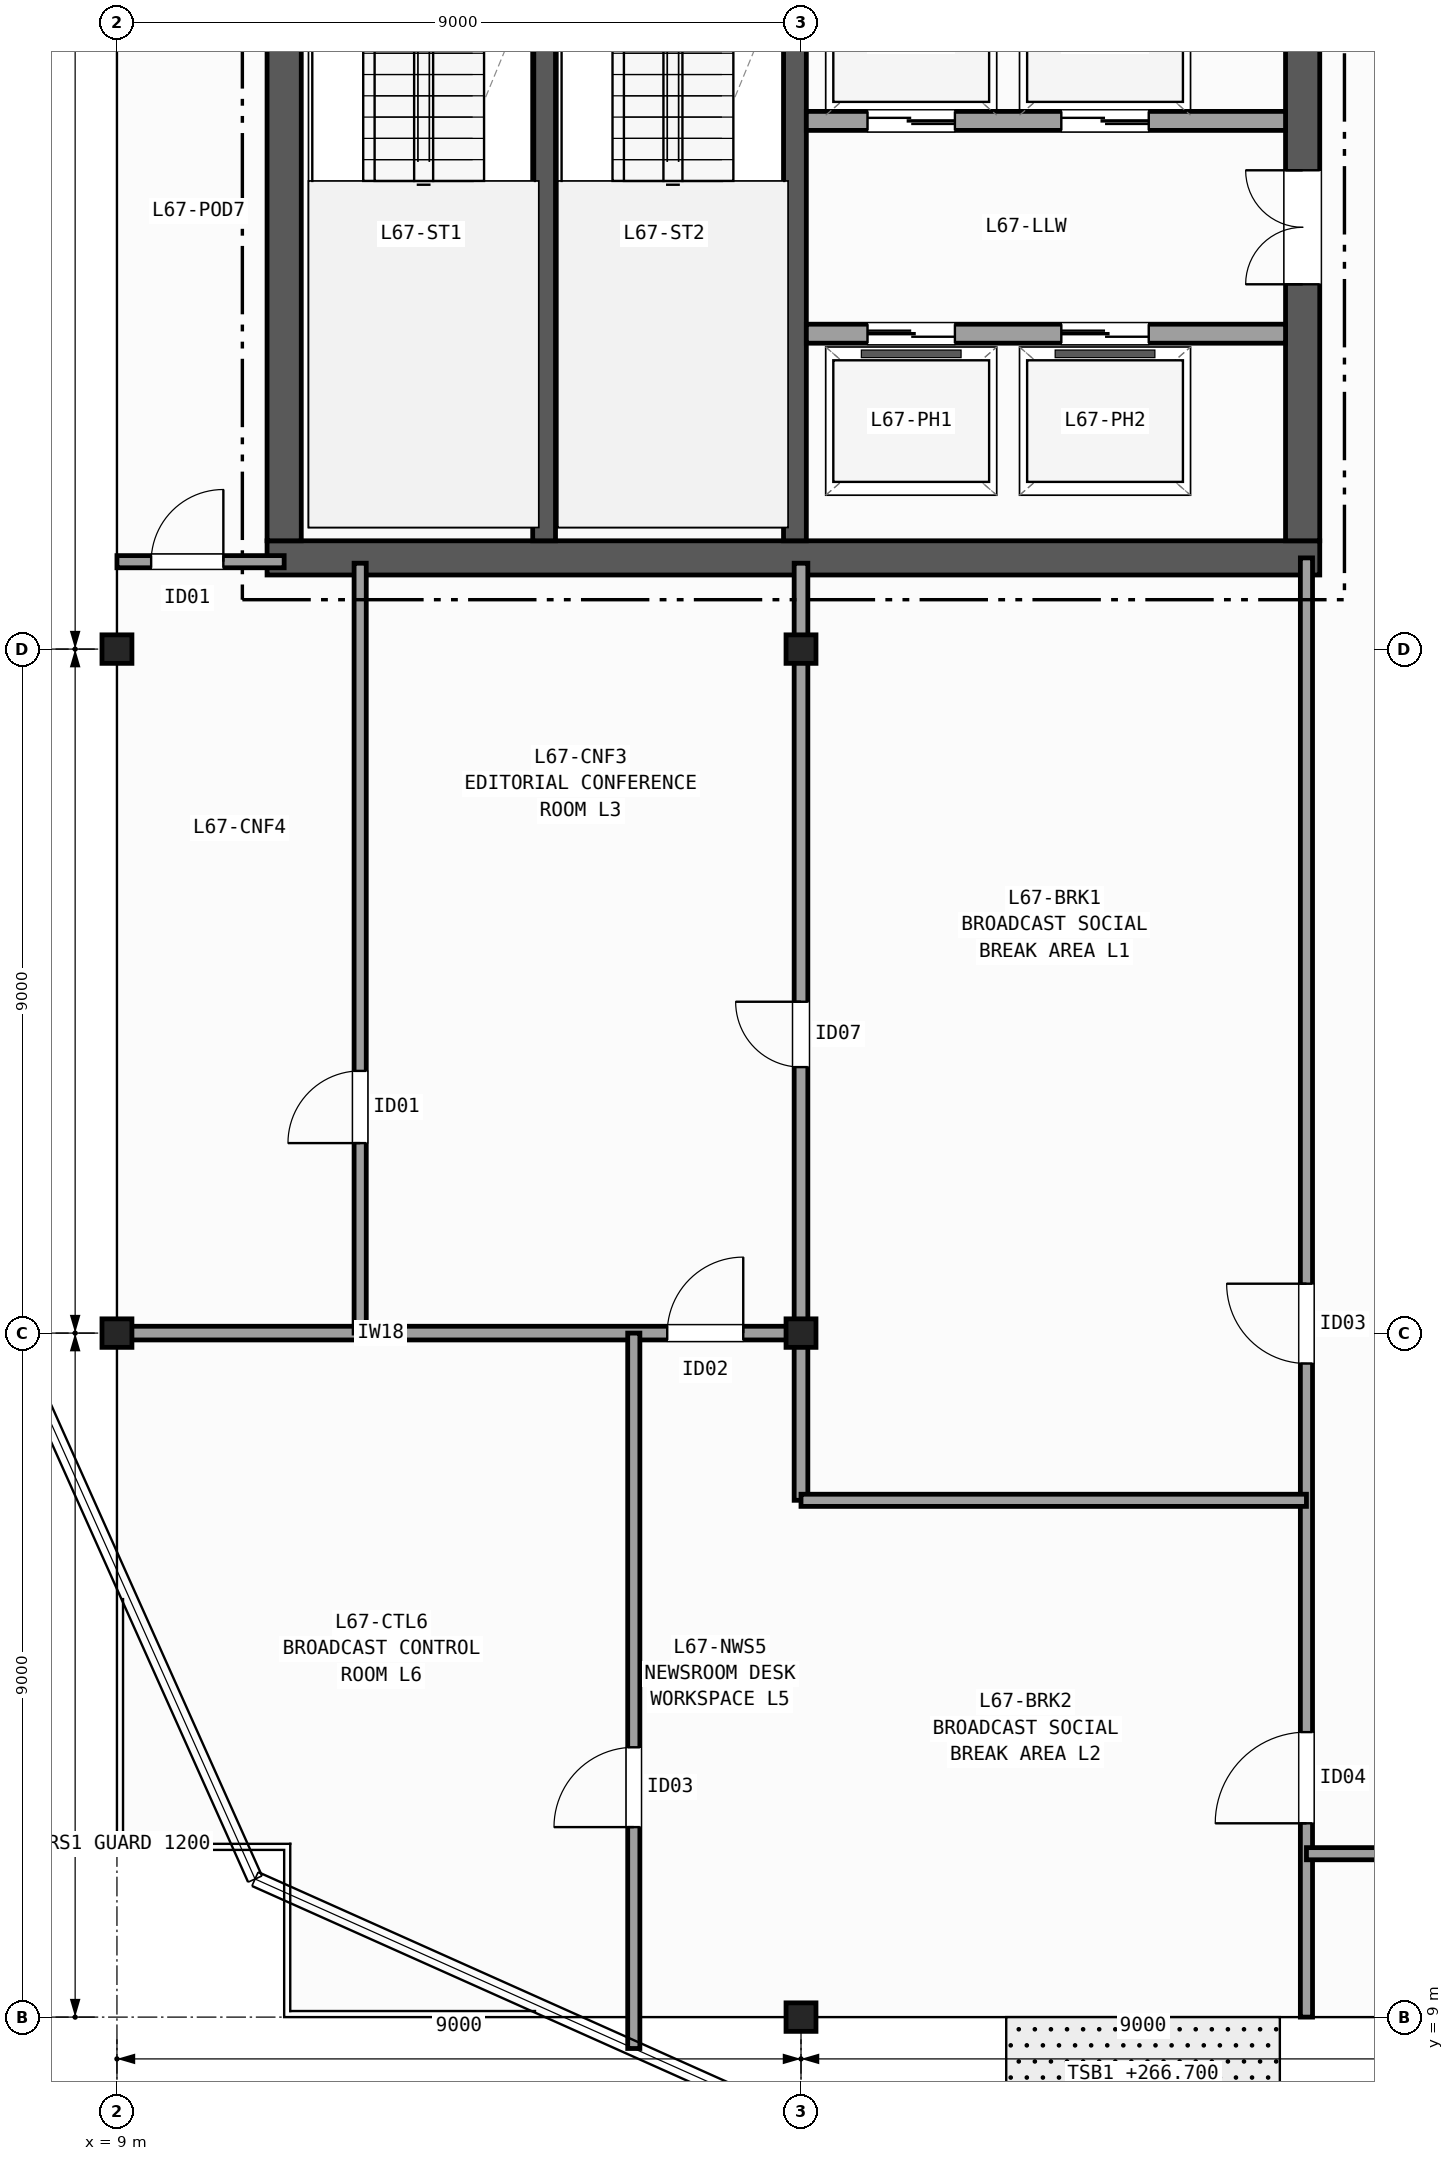
"""IFC4 building model, lengths in metres.
Left out: names, types, materials, properties, quantities, classifications, styles, units other than length and angle.
Written with IfcOpenShell. Run it as: python <this file> out.ifc"""

import sys

from ifc_helpers import new_model, si_unit, direction, frame, frame_2d, origin, origin_2d, place, context, subcontext, project, spatial, rectangle, i_section, extrude, element, fill, save


model = new_model("IFC4")
c1 = context("Model", 3, precision=1e-05, world=origin(), true_north=direction((0.0, 1.0)))
c2 = subcontext(c1, "Body", "Model", "MODEL_VIEW")
j1 = project(units=[si_unit("LENGTHUNIT", "METRE"), si_unit("PLANEANGLEUNIT", "RADIAN")], contexts=[c1])
p1 = place(None, origin())
s1 = spatial("IfcSite", under=j1, at=p1, CompositionType="ELEMENT")
p2 = place(p1, origin())
s2 = spatial("IfcBuilding", under=s1, at=p2, CompositionType="ELEMENT")
p3 = place(p2, frame((0.0, 0.0, 266.7)))
s3 = spatial("IfcBuildingStorey", under=s2, at=p3, CompositionType="ELEMENT", Elevation=266.7)
for number, where, z_axis, x_axis in (
    (1, (9.0, 18.0, 0.0), (0.0, 0.0, 1.0), (1.0, 0.0, 0.0)),
    (2, (9.0, 27.0, 0.0), (0.0, 0.0, 1.0), (1.0, 0.0, 0.0)),
    (3, (18.0, 9.0, 0.0), (0.0, 0.0, 1.0), (1.0, 0.0, 0.0)),
    (4, (18.0, 18.0, 0.0), (0.0, 0.0, 1.0), (1.0, 0.0, 0.0)),
    (5, (18.0, 27.0, 0.0), (0.0, 0.0, 1.0), (1.0, 0.0, 0.0)),
):
    element("IfcColumn", number, at=place(p3, frame(where, z_axis=z_axis, x_axis=x_axis)), inside=s3, PredefinedType="COLUMN", context=c2, shape_type="SweptSolid", body=[
        extrude(i_section(OverallWidth=0.394, OverallDepth=0.375, WebThickness=0.017, FlangeThickness=0.028, FilletRadius=0.015, at=origin_2d()), origin(), (0.0, 0.0, 1.0), 3.7),
    ])
p4 = place(p3, frame((10.975, 28.2, 0.0), z_axis=(0.0, 0.0, 1.0), x_axis=(1.0, 0.0, 0.0)))
e6 = element("IfcWall", 6, at=p4, inside=s3, PredefinedType="SHEAR", context=c2, shape_type="SweptSolid", body=[
    extrude(rectangle(XDim=13.85, YDim=0.45, at=frame_2d((6.925, 0.0))), origin(), (0.0, 0.0, 1.0), 3.42),
])
p5 = place(p3, frame((11.2, 42.175, 0.0), z_axis=(0.0, 0.0, 1.0), x_axis=(0.0, -1.0, 0.0)))
e7 = element("IfcWall", 7, at=p5, inside=s3, PredefinedType="SHEAR", context=c2, shape_type="SweptSolid", body=[
    extrude(rectangle(XDim=13.75, YDim=0.45, at=frame_2d((6.875, 0.0))), origin(), (0.0, 0.0, 1.0), 3.42),
])
p6 = place(p3, frame((24.6, 28.425, 0.0), z_axis=(0.0, 0.0, 1.0), x_axis=(0.0, 1.0, 0.0)))
e8 = element("IfcWall", 8, at=p6, inside=s3, PredefinedType="SHEAR", context=c2, shape_type="SweptSolid", body=[
    extrude(rectangle(XDim=13.75, YDim=0.45, at=frame_2d((6.875, 0.0))), origin(), (0.0, 0.0, 1.0), 3.42),
])
p7 = place(p6, frame((3.375, 0.0, 0.0)))
e9 = element("IfcOpeningElement", 9, at=p7, cuts=e8, PredefinedType="OPENING", context=c2, shape_type="SweptSolid", body=[
    extrude(rectangle(XDim=1.5, YDim=2.2, at=frame_2d((0.75, 1.1))), frame((0.0, 0.235, 0.0), z_axis=(0.0, -1.0, 0.0), x_axis=(1.0, 0.0, 0.0)), (0.0, 0.0, 1.0), 0.47),
])
p8 = place(p6, frame((9.975, 0.0, 0.0)))
e10 = element("IfcOpeningElement", 10, at=p8, cuts=e8, PredefinedType="OPENING", context=c2, shape_type="SweptSolid", body=[
    extrude(rectangle(XDim=0.9, YDim=2.1, at=frame_2d((0.45, 1.05))), frame((0.0, 0.235, 0.0), z_axis=(0.0, -1.0, 0.0), x_axis=(1.0, 0.0, 0.0)), (0.0, 0.0, 1.0), 0.47),
])
p9 = place(p6, frame((12.075, 0.0, 0.0)))
e11 = element("IfcOpeningElement", 11, at=p9, cuts=e8, PredefinedType="OPENING", context=c2, shape_type="SweptSolid", body=[
    extrude(rectangle(XDim=0.9, YDim=2.1, at=frame_2d((0.45, 1.05))), frame((0.0, 0.235, 0.0), z_axis=(0.0, -1.0, 0.0), x_axis=(1.0, 0.0, 0.0)), (0.0, 0.0, 1.0), 0.47),
])
p10 = place(p3, frame((14.62, 28.425, 0.0), z_axis=(0.0, 0.0, 1.0), x_axis=(0.0, 1.0, 0.0)))
e12 = element("IfcWall", 12, at=p10, inside=s3, PredefinedType="SHEAR", context=c2, shape_type="SweptSolid", body=[
    extrude(rectangle(XDim=9.025, YDim=0.3, at=frame_2d((4.512, 0.0))), origin(), (0.0, 0.0, 1.0), 3.42),
])
p11 = place(p3, frame((17.92, 42.175, 0.0), z_axis=(0.0, 0.0, 1.0), x_axis=(0.0, -1.0, 0.0)))
e13 = element("IfcWall", 13, at=p11, inside=s3, PredefinedType="SHEAR", context=c2, shape_type="SweptSolid", body=[
    extrude(rectangle(XDim=13.75, YDim=0.3, at=frame_2d((6.875, 0.0))), origin(), (0.0, 0.0, 1.0), 3.42),
])
p12 = place(p11, frame((2.0, 0.0, 0.0)))
e14 = element("IfcOpeningElement", 14, at=p12, cuts=e13, PredefinedType="OPENING", context=c2, shape_type="SweptSolid", body=[
    extrude(rectangle(XDim=1.15, YDim=2.15, at=frame_2d((0.575, 1.075))), frame((0.0, 0.16, 0.0), z_axis=(0.0, -1.0, 0.0), x_axis=(1.0, 0.0, 0.0)), (0.0, 0.0, 1.0), 0.32),
])
p13 = place(p3, frame((18.07, 31.15, 0.0), z_axis=(0.0, 0.0, 1.0), x_axis=(1.0, 0.0, 0.0)))
e15 = element("IfcWall", 15, at=p13, inside=s3, PredefinedType="PARTITIONING", context=c2, shape_type="SweptSolid", body=[
    extrude(rectangle(XDim=6.305, YDim=0.25, at=frame_2d((3.152, 0.0))), origin(), (0.0, 0.0, 1.0), 3.42),
])
p14 = place(p13, frame((0.805, 0.0, 0.0)))
e16 = element("IfcOpeningElement", 16, at=p14, cuts=e15, PredefinedType="OPENING", context=c2, shape_type="SweptSolid", body=[
    extrude(rectangle(XDim=1.15, YDim=2.15, at=frame_2d((0.575, 1.075))), frame((0.0, 0.135, 0.0), z_axis=(0.0, -1.0, 0.0), x_axis=(1.0, 0.0, 0.0)), (0.0, 0.0, 1.0), 0.27),
])
p15 = place(p13, frame((3.355, 0.0, 0.0)))
e17 = element("IfcOpeningElement", 17, at=p15, cuts=e15, PredefinedType="OPENING", context=c2, shape_type="SweptSolid", body=[
    extrude(rectangle(XDim=1.15, YDim=2.15, at=frame_2d((0.575, 1.075))), frame((0.0, 0.135, 0.0), z_axis=(0.0, -1.0, 0.0), x_axis=(1.0, 0.0, 0.0)), (0.0, 0.0, 1.0), 0.27),
])
p16 = place(p3, frame((24.375, 33.95, 0.0), z_axis=(0.0, 0.0, 1.0), x_axis=(-1.0, 0.0, 0.0)))
e18 = element("IfcWall", 18, at=p16, inside=s3, PredefinedType="PARTITIONING", context=c2, shape_type="SweptSolid", body=[
    extrude(rectangle(XDim=6.305, YDim=0.25, at=frame_2d((3.152, 0.0))), origin(), (0.0, 0.0, 1.0), 3.42),
])
p17 = place(p16, frame((4.35, 0.0, 0.0)))
e19 = element("IfcOpeningElement", 19, at=p17, cuts=e18, PredefinedType="OPENING", context=c2, shape_type="SweptSolid", body=[
    extrude(rectangle(XDim=1.15, YDim=2.15, at=frame_2d((0.575, 1.075))), frame((0.0, 0.135, 0.0), z_axis=(0.0, -1.0, 0.0), x_axis=(1.0, 0.0, 0.0)), (0.0, 0.0, 1.0), 0.27),
])
p18 = place(p16, frame((1.8, 0.0, 0.0)))
e20 = element("IfcOpeningElement", 20, at=p18, cuts=e18, PredefinedType="OPENING", context=c2, shape_type="SweptSolid", body=[
    extrude(rectangle(XDim=1.15, YDim=2.15, at=frame_2d((0.575, 1.075))), frame((0.0, 0.135, 0.0), z_axis=(0.0, -1.0, 0.0), x_axis=(1.0, 0.0, 0.0)), (0.0, 0.0, 1.0), 0.27),
])
p19 = place(p3, frame((9.0, 28.15, 0.0), z_axis=(0.0, 0.0, 1.0), x_axis=(1.0, 0.0, 0.0)))
e21 = element("IfcWall", 21, at=p19, inside=s3, PredefinedType="PARTITIONING", context=c2, shape_type="SweptSolid", body=[
    extrude(rectangle(XDim=2.2, YDim=0.16, at=frame_2d((1.1, 0.0))), origin(), (0.0, 0.0, 1.0), 2.707),
])
p20 = place(p19, frame((0.45, 0.0, 0.0)))
e22 = element("IfcOpeningElement", 22, at=p20, cuts=e21, PredefinedType="OPENING", context=c2, shape_type="SweptSolid", body=[
    extrude(rectangle(XDim=0.95, YDim=2.1, at=frame_2d((0.475, 1.05))), frame((0.0, 0.09, 0.0), z_axis=(0.0, -1.0, 0.0), x_axis=(1.0, 0.0, 0.0)), (0.0, 0.0, 1.0), 0.18),
])
p21 = place(p3, frame((24.65, 9.0, 0.0), z_axis=(0.0, 0.0, 1.0), x_axis=(0.0, 1.0, 0.0)))
e23 = element("IfcWall", 23, at=p21, inside=s3, PredefinedType="PARTITIONING", context=c2, shape_type="SweptSolid", body=[
    extrude(rectangle(XDim=19.2, YDim=0.16, at=frame_2d((9.6, 0.0))), origin(), (0.0, 0.0, 1.0), 2.707),
])
p22 = place(p21, frame((8.6, 0.0, 0.0)))
e24 = element("IfcOpeningElement", 24, at=p22, cuts=e23, PredefinedType="OPENING", context=c2, shape_type="SweptSolid", body=[
    extrude(rectangle(XDim=1.05, YDim=2.15, at=frame_2d((0.525, 1.075))), frame((0.0, 0.09, 0.0), z_axis=(0.0, -1.0, 0.0), x_axis=(1.0, 0.0, 0.0)), (0.0, 0.0, 1.0), 0.18),
])
p23 = place(p21, frame((2.55, 0.0, 0.0)))
e25 = element("IfcOpeningElement", 25, at=p23, cuts=e23, PredefinedType="OPENING", context=c2, shape_type="SweptSolid", body=[
    extrude(rectangle(XDim=1.2, YDim=2.15, at=frame_2d((0.6, 1.075))), frame((0.0, 0.09, 0.0), z_axis=(0.0, -1.0, 0.0), x_axis=(1.0, 0.0, 0.0)), (0.0, 0.0, 1.0), 0.18),
])
p24 = place(p3, frame((9.0, 18.0, 0.0), z_axis=(0.0, 0.0, 1.0), x_axis=(1.0, 0.0, 0.0)))
e26 = element("IfcWall", 26, at=p24, inside=s3, PredefinedType="PARTITIONING", context=c2, shape_type="SweptSolid", body=[
    extrude(rectangle(XDim=9.08, YDim=0.18, at=frame_2d((4.54, 0.0))), origin(), (0.0, 0.0, 1.0), 2.707),
])
p25 = place(p24, frame((7.24, 0.0, 0.0)))
e27 = element("IfcOpeningElement", 27, at=p25, cuts=e26, PredefinedType="OPENING", context=c2, shape_type="SweptSolid", body=[
    extrude(rectangle(XDim=1.0, YDim=2.1, at=frame_2d((0.5, 1.05))), frame((0.0, 0.1, 0.0), z_axis=(0.0, -1.0, 0.0), x_axis=(1.0, 0.0, 0.0)), (0.0, 0.0, 1.0), 0.2),
])
p26 = place(p3, frame((18.0, 15.8, 0.0), z_axis=(0.0, 0.0, 1.0), x_axis=(0.0, 1.0, 0.0)))
e28 = element("IfcWall", 28, at=p26, inside=s3, PredefinedType="PARTITIONING", context=c2, shape_type="SweptSolid", body=[
    extrude(rectangle(XDim=12.33, YDim=0.18, at=frame_2d((6.165, 0.0))), origin(), (0.0, 0.0, 1.0), 2.789),
])
p27 = place(p26, frame((5.7, 0.0, 0.0)))
e29 = element("IfcOpeningElement", 29, at=p27, cuts=e28, PredefinedType="OPENING", context=c2, shape_type="SweptSolid", body=[
    extrude(rectangle(XDim=0.86, YDim=2.05, at=frame_2d((0.43, 1.025))), frame((0.0, 0.1, 0.0), z_axis=(0.0, -1.0, 0.0), x_axis=(1.0, 0.0, 0.0)), (0.0, 0.0, 1.0), 0.2),
])
p28 = place(p3, frame((18.0, 15.8, 0.0), z_axis=(0.0, 0.0, 1.0), x_axis=(1.0, 0.0, 0.0)))
e30 = element("IfcWall", 30, at=p28, inside=s3, PredefinedType="PARTITIONING", context=c2, shape_type="SweptSolid", body=[
    extrude(rectangle(XDim=6.65, YDim=0.16, at=frame_2d((3.325, 0.0))), origin(), (0.0, 0.0, 1.0), 2.792),
])
p29 = place(p3, frame((12.2, 18.0, 0.0), z_axis=(0.0, 0.0, 1.0), x_axis=(0.0, 1.0, 0.0)))
e31 = element("IfcWall", 31, at=p29, inside=s3, PredefinedType="PARTITIONING", context=c2, shape_type="SweptSolid", body=[
    extrude(rectangle(XDim=10.13, YDim=0.16, at=frame_2d((5.065, 0.0))), origin(), (0.0, 0.0, 1.0), 2.789),
])
p30 = place(p29, frame((2.5, 0.0, 0.0)))
e32 = element("IfcOpeningElement", 32, at=p30, cuts=e31, PredefinedType="OPENING", context=c2, shape_type="SweptSolid", body=[
    extrude(rectangle(XDim=0.95, YDim=2.1, at=frame_2d((0.475, 1.05))), frame((0.0, 0.09, 0.0), z_axis=(0.0, -1.0, 0.0), x_axis=(1.0, 0.0, 0.0)), (0.0, 0.0, 1.0), 0.18),
])
p31 = place(p3, frame((15.8, 8.587, 0.0), z_axis=(0.0, 0.0, 1.0), x_axis=(0.0, 1.0, 0.0)))
e33 = element("IfcWall", 33, at=p31, inside=s3, PredefinedType="PARTITIONING", context=c2, shape_type="SweptSolid", body=[
    extrude(rectangle(XDim=9.413, YDim=0.16, at=frame_2d((4.707, 0.0))), origin(), (0.0, 0.0, 1.0), 2.789),
])
p32 = place(p31, frame((2.913, 0.0, 0.0)))
e34 = element("IfcOpeningElement", 34, at=p32, cuts=e33, PredefinedType="OPENING", context=c2, shape_type="SweptSolid", body=[
    extrude(rectangle(XDim=1.05, YDim=2.15, at=frame_2d((0.525, 1.075))), frame((0.0, 0.09, 0.0), z_axis=(0.0, -1.0, 0.0), x_axis=(1.0, 0.0, 0.0)), (0.0, 0.0, 1.0), 0.18),
])
p33 = place(p3, frame((24.65, 11.15, 0.0), z_axis=(0.0, 0.0, 1.0), x_axis=(1.0, 0.0, 0.0)))
e35 = element("IfcWall", 35, at=p33, inside=s3, PredefinedType="PARTITIONING", context=c2, shape_type="SweptSolid", body=[
    extrude(rectangle(XDim=4.75, YDim=0.16, at=frame_2d((2.375, 0.0))), origin(), (0.0, 0.0, 1.0), 2.792),
])
p34 = place(p33, frame((1.2, 0.0, 0.0)))
e36 = element("IfcOpeningElement", 36, at=p34, cuts=e35, PredefinedType="OPENING", context=c2, shape_type="SweptSolid", body=[
    extrude(rectangle(XDim=1.2, YDim=2.15, at=frame_2d((0.6, 1.075))), frame((0.0, 0.09, 0.0), z_axis=(0.0, -1.0, 0.0), x_axis=(1.0, 0.0, 0.0)), (0.0, 0.0, 1.0), 0.18),
])
p35 = place(p7, origin())
e37 = element("IfcDoor", 37, at=p35, inside=s3, OperationType="DOUBLE_DOOR_SINGLE_SWING", PredefinedType="DOOR", context=c2, shape_type="SweptSolid", body=[
    extrude(rectangle(XDim=1.5, YDim=2.2, at=frame_2d((0.75, 1.1))), frame((0.0, 0.025, 0.0), z_axis=(0.0, -1.0, 0.0), x_axis=(1.0, 0.0, 0.0)), (0.0, 0.0, 1.0), 0.05),
])
fill(e9, e37)
p36 = place(p14, origin())
e38 = element("IfcDoor", 38, at=p36, inside=s3, OperationType="DOUBLE_DOOR_SLIDING", PredefinedType="DOOR", context=c2, shape_type="SweptSolid", body=[
    extrude(rectangle(XDim=1.15, YDim=2.15, at=frame_2d((0.575, 1.075))), frame((0.0, 0.025, 0.0), z_axis=(0.0, -1.0, 0.0), x_axis=(1.0, 0.0, 0.0)), (0.0, 0.0, 1.0), 0.05),
])
fill(e16, e38)
p37 = place(p15, origin())
e39 = element("IfcDoor", 39, at=p37, inside=s3, OperationType="DOUBLE_DOOR_SLIDING", PredefinedType="DOOR", context=c2, shape_type="SweptSolid", body=[
    extrude(rectangle(XDim=1.15, YDim=2.15, at=frame_2d((0.575, 1.075))), frame((0.0, 0.025, 0.0), z_axis=(0.0, -1.0, 0.0), x_axis=(1.0, 0.0, 0.0)), (0.0, 0.0, 1.0), 0.05),
])
fill(e17, e39)
p38 = place(p17, origin())
e40 = element("IfcDoor", 40, at=p38, inside=s3, OperationType="DOUBLE_DOOR_SLIDING", PredefinedType="DOOR", context=c2, shape_type="SweptSolid", body=[
    extrude(rectangle(XDim=1.15, YDim=2.15, at=frame_2d((0.575, 1.075))), frame((0.0, 0.025, 0.0), z_axis=(0.0, -1.0, 0.0), x_axis=(1.0, 0.0, 0.0)), (0.0, 0.0, 1.0), 0.05),
])
fill(e19, e40)
p39 = place(p18, origin())
e41 = element("IfcDoor", 41, at=p39, inside=s3, OperationType="DOUBLE_DOOR_SLIDING", PredefinedType="DOOR", context=c2, shape_type="SweptSolid", body=[
    extrude(rectangle(XDim=1.15, YDim=2.15, at=frame_2d((0.575, 1.075))), frame((0.0, 0.025, 0.0), z_axis=(0.0, -1.0, 0.0), x_axis=(1.0, 0.0, 0.0)), (0.0, 0.0, 1.0), 0.05),
])
fill(e20, e41)
p40 = place(p20, origin())
e42 = element("IfcDoor", 42, at=p40, inside=s3, OperationType="SINGLE_SWING_RIGHT", PredefinedType="DOOR", context=c2, shape_type="SweptSolid", body=[
    extrude(rectangle(XDim=0.95, YDim=2.1, at=frame_2d((0.475, 1.05))), frame((0.0, 0.025, 0.0), z_axis=(0.0, -1.0, 0.0), x_axis=(1.0, 0.0, 0.0)), (0.0, 0.0, 1.0), 0.05),
])
fill(e22, e42)
p41 = place(p22, origin())
e43 = element("IfcDoor", 43, at=p41, inside=s3, OperationType="SINGLE_SWING_RIGHT", PredefinedType="DOOR", context=c2, shape_type="SweptSolid", body=[
    extrude(rectangle(XDim=1.05, YDim=2.15, at=frame_2d((0.525, 1.075))), frame((0.0, 0.025, 0.0), z_axis=(0.0, -1.0, 0.0), x_axis=(1.0, 0.0, 0.0)), (0.0, 0.0, 1.0), 0.05),
])
fill(e24, e43)
p42 = place(p23, origin())
e44 = element("IfcDoor", 44, at=p42, inside=s3, OperationType="SINGLE_SWING_LEFT", PredefinedType="DOOR", context=c2, shape_type="SweptSolid", body=[
    extrude(rectangle(XDim=1.2, YDim=2.15, at=frame_2d((0.6, 1.075))), frame((0.0, 0.025, 0.0), z_axis=(0.0, -1.0, 0.0), x_axis=(1.0, 0.0, 0.0)), (0.0, 0.0, 1.0), 0.05),
])
fill(e25, e44)
p43 = place(p27, origin())
e45 = element("IfcDoor", 45, at=p43, inside=s3, OperationType="SINGLE_SWING_RIGHT", PredefinedType="DOOR", context=c2, shape_type="SweptSolid", body=[
    extrude(rectangle(XDim=0.86, YDim=2.05, at=frame_2d((0.43, 1.025))), frame((0.0, 0.025, 0.0), z_axis=(0.0, -1.0, 0.0), x_axis=(1.0, 0.0, 0.0)), (0.0, 0.0, 1.0), 0.05),
])
fill(e29, e45)
p44 = place(p30, origin())
e46 = element("IfcDoor", 46, at=p44, inside=s3, OperationType="SINGLE_SWING_LEFT", PredefinedType="DOOR", context=c2, shape_type="SweptSolid", body=[
    extrude(rectangle(XDim=0.95, YDim=2.1, at=frame_2d((0.475, 1.05))), frame((0.0, 0.025, 0.0), z_axis=(0.0, -1.0, 0.0), x_axis=(1.0, 0.0, 0.0)), (0.0, 0.0, 1.0), 0.05),
])
fill(e32, e46)
p45 = place(p25, origin())
e47 = element("IfcDoor", 47, at=p45, inside=s3, OperationType="SINGLE_SWING_RIGHT", PredefinedType="DOOR", context=c2, shape_type="SweptSolid", body=[
    extrude(rectangle(XDim=1.0, YDim=2.1, at=frame_2d((0.5, 1.05))), frame((0.0, 0.025, 0.0), z_axis=(0.0, -1.0, 0.0), x_axis=(1.0, 0.0, 0.0)), (0.0, 0.0, 1.0), 0.05),
])
fill(e27, e47)
p46 = place(p32, origin())
e48 = element("IfcDoor", 48, at=p46, inside=s3, OperationType="SINGLE_SWING_LEFT", PredefinedType="DOOR", context=c2, shape_type="SweptSolid", body=[
    extrude(rectangle(XDim=1.05, YDim=2.15, at=frame_2d((0.525, 1.075))), frame((0.0, 0.025, 0.0), z_axis=(0.0, -1.0, 0.0), x_axis=(1.0, 0.0, 0.0)), (0.0, 0.0, 1.0), 0.05),
])
fill(e34, e48)
save(model, sys.argv[1])
